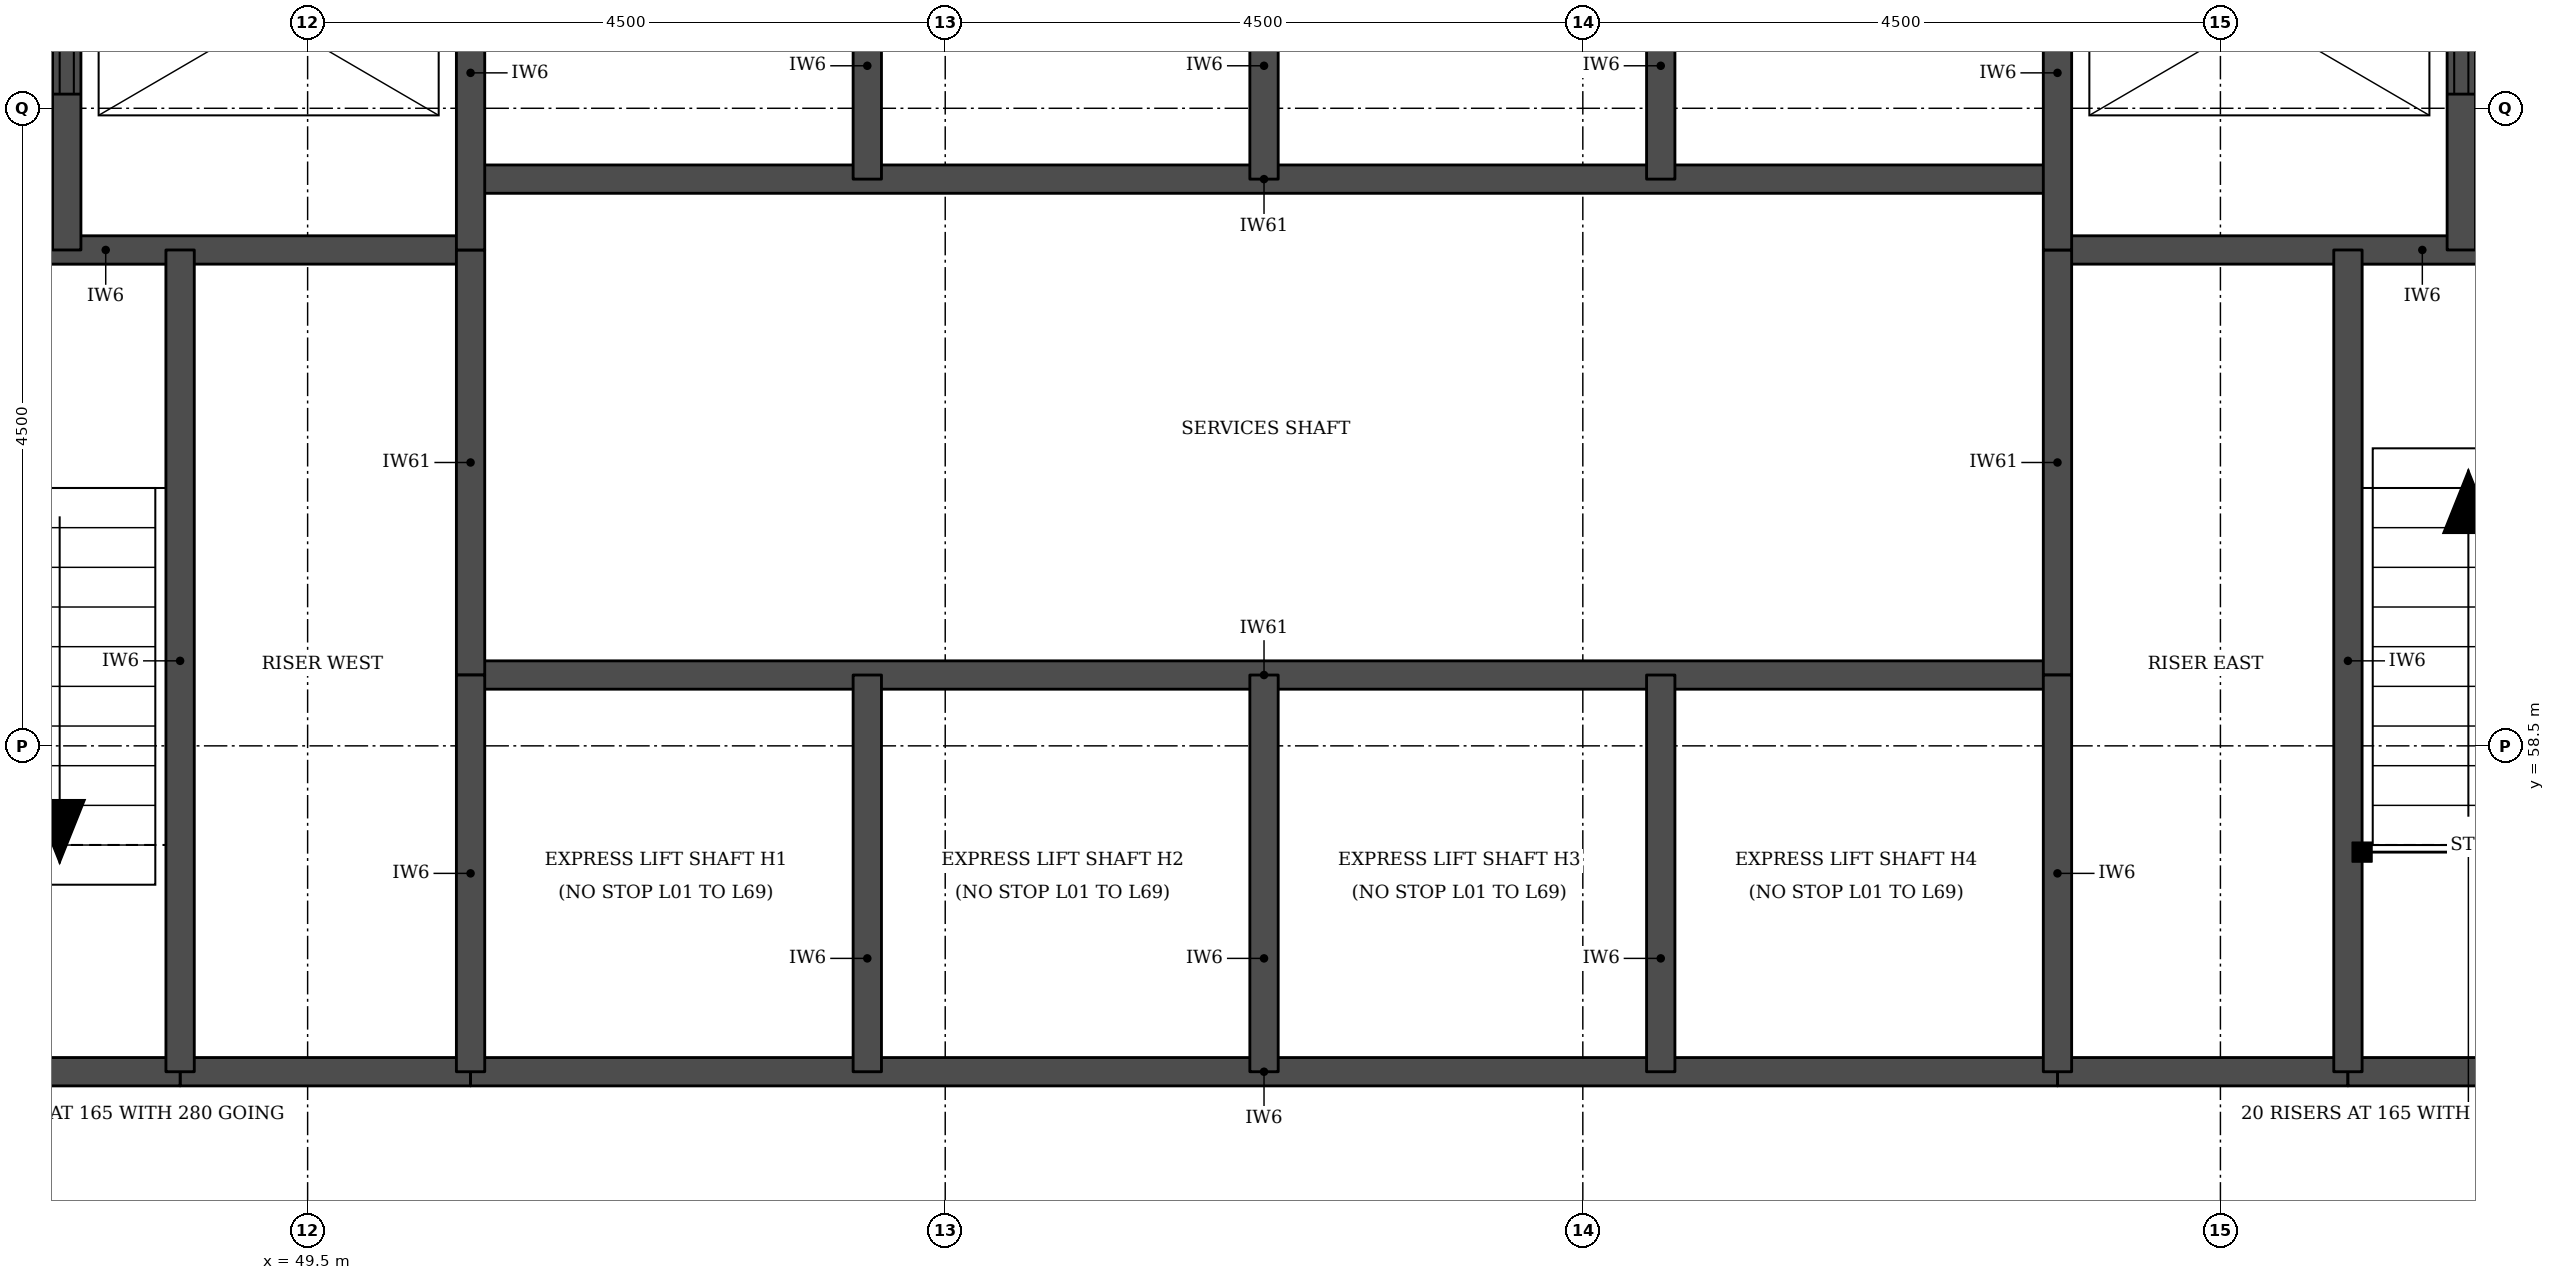
"""IFC4 building model, lengths in metres.
Left out: names, types, materials, properties, quantities, classifications, styles, units other than length and angle.
Written with IfcOpenShell. Run it as: python <this file> out.ifc"""

import sys

from ifc_helpers import new_model, si_unit, direction, frame, frame_2d, origin, place, context, subcontext, project, spatial, rectangle, extrude, element, fill, save


model = new_model("IFC4")
c1 = context("Model", 3, precision=1e-05, world=origin(), true_north=direction((0.0, 1.0)))
c2 = subcontext(c1, "Body", "Model", "MODEL_VIEW")
j1 = project(units=[si_unit("LENGTHUNIT", "METRE"), si_unit("PLANEANGLEUNIT", "RADIAN")], contexts=[c1])
p1 = place(None, origin())
s1 = spatial("IfcSite", under=j1, at=p1, CompositionType="ELEMENT")
p2 = place(p1, origin())
s2 = spatial("IfcBuilding", under=s1, at=p2, CompositionType="ELEMENT")
p3 = place(p2, frame((0.0, 0.0, 59.4)))
s3 = spatial("IfcBuildingStorey", under=s2, at=p3, CompositionType="ELEMENT", Elevation=59.4)
for number, where, z_axis, x_axis in (
    (1, (48.6, 56.2, 0.0), (0.0, 0.0, 1.0), (1.0, 0.0, 0.0)),
    (2, (61.85, 56.2, 0.0), (0.0, 0.0, 1.0), (1.0, 0.0, 0.0)),
):
    element("IfcWall", number, at=place(p3, frame(where, z_axis=z_axis, x_axis=x_axis)), inside=s3, PredefinedType="SOLIDWALL", context=c2, shape_type="SweptSolid", body=[
        extrude(rectangle(XDim=2.05, YDim=0.2, at=frame_2d((1.025, 0.0))), origin(), (0.0, 0.0, 1.0), 3.08),
    ])
p4 = place(p3, frame((45.5, 56.2, 0.0), z_axis=(0.0, 0.0, 1.0), x_axis=(1.0, 0.0, 0.0)))
e3 = element("IfcWall", 3, at=p4, inside=s3, PredefinedType="SOLIDWALL", context=c2, shape_type="SweptSolid", body=[
    extrude(rectangle(XDim=3.1, YDim=0.2, at=frame_2d((1.55, 0.0))), origin(), (0.0, 0.0, 1.0), 3.08),
])
p5 = place(p3, frame((50.65, 56.2, 0.0), z_axis=(0.0, 0.0, 1.0), x_axis=(1.0, 0.0, 0.0)))
e4 = element("IfcWall", 4, at=p5, inside=s3, PredefinedType="SOLIDWALL", context=c2, shape_type="SweptSolid", body=[
    extrude(rectangle(XDim=11.2, YDim=0.2, at=frame_2d((5.6, 0.0))), origin(), (0.0, 0.0, 1.0), 3.08),
])
p6 = place(p3, frame((63.9, 56.2, 0.0), z_axis=(0.0, 0.0, 1.0), x_axis=(1.0, 0.0, 0.0)))
e5 = element("IfcWall", 5, at=p6, inside=s3, PredefinedType="SOLIDWALL", context=c2, shape_type="SweptSolid", body=[
    extrude(rectangle(XDim=3.1, YDim=0.2, at=frame_2d((1.55, 0.0))), origin(), (0.0, 0.0, 1.0), 3.08),
])
p7 = place(p3, frame((50.65, 59.0, 0.0), z_axis=(0.0, 0.0, 1.0), x_axis=(1.0, 0.0, 0.0)))
e6 = element("IfcWall", 6, at=p7, inside=s3, PredefinedType="SOLIDWALL", context=c2, shape_type="SweptSolid", body=[
    extrude(rectangle(XDim=11.2, YDim=0.2, at=frame_2d((5.6, 0.0))), origin(), (0.0, 0.0, 1.0), 3.3),
])
for number, where, z_axis, x_axis in (
    (7, (45.5, 62.0, 0.0), (0.0, 0.0, 1.0), (1.0, 0.0, 0.0)),
    (8, (61.85, 62.0, 0.0), (0.0, 0.0, 1.0), (1.0, 0.0, 0.0)),
):
    element("IfcWall", number, at=place(p3, frame(where, z_axis=z_axis, x_axis=x_axis)), inside=s3, PredefinedType="SOLIDWALL", context=c2, shape_type="SweptSolid", body=[
        extrude(rectangle(XDim=5.15, YDim=0.2, at=frame_2d((2.575, 0.0))), origin(), (0.0, 0.0, 1.0), 3.08),
    ])
p8 = place(p3, frame((50.65, 62.5, 0.0), z_axis=(0.0, 0.0, 1.0), x_axis=(1.0, 0.0, 0.0)))
e9 = element("IfcWall", 9, at=p8, inside=s3, PredefinedType="SOLIDWALL", context=c2, shape_type="SweptSolid", body=[
    extrude(rectangle(XDim=11.2, YDim=0.2, at=frame_2d((5.6, 0.0))), origin(), (0.0, 0.0, 1.0), 3.3),
])
p9 = place(p3, frame((47.8, 62.0, 0.0), z_axis=(0.0, 0.0, 1.0), x_axis=(0.0, 1.0, 0.0)))
e10 = element("IfcWall", 10, at=p9, inside=s3, PredefinedType="SOLIDWALL", context=c2, shape_type="SweptSolid", body=[
    extrude(rectangle(XDim=3.3, YDim=0.2, at=frame_2d((1.65, 0.0))), origin(), (0.0, 0.0, 1.0), 3.08),
])
p10 = place(p9, frame((1.1, 0.0, 0.0)))
e11 = element("IfcOpeningElement", 11, at=p10, cuts=e10, PredefinedType="OPENING", context=c2, shape_type="SweptSolid", body=[
    extrude(rectangle(XDim=1.1, YDim=2.1, at=frame_2d((0.55, 1.05))), frame((0.0, 0.11, 0.0), z_axis=(0.0, -1.0, 0.0), x_axis=(1.0, 0.0, 0.0)), (0.0, 0.0, 1.0), 0.22),
])
p11 = place(p3, frame((48.6, 56.2, 0.0), z_axis=(0.0, 0.0, 1.0), x_axis=(0.0, 1.0, 0.0)))
e12 = element("IfcWall", 12, at=p11, inside=s3, PredefinedType="SOLIDWALL", context=c2, shape_type="SweptSolid", body=[
    extrude(rectangle(XDim=5.8, YDim=0.2, at=frame_2d((2.9, 0.0))), origin(), (0.0, 0.0, 1.0), 3.08),
])
p12 = place(p3, frame((50.65, 59.0, 0.0), z_axis=(0.0, 0.0, 1.0), x_axis=(0.0, 1.0, 0.0)))
e13 = element("IfcWall", 13, at=p12, inside=s3, PredefinedType="SOLIDWALL", context=c2, shape_type="SweptSolid", body=[
    extrude(rectangle(XDim=3.0, YDim=0.2, at=frame_2d((1.5, 0.0))), origin(), (0.0, 0.0, 1.0), 3.3),
])
p13 = place(p3, frame((50.65, 56.2, 0.0), z_axis=(0.0, 0.0, 1.0), x_axis=(0.0, 1.0, 0.0)))
e14 = element("IfcWall", 14, at=p13, inside=s3, PredefinedType="SOLIDWALL", context=c2, shape_type="SweptSolid", body=[
    extrude(rectangle(XDim=2.8, YDim=0.2, at=frame_2d((1.4, 0.0))), origin(), (0.0, 0.0, 1.0), 3.08),
])
p14 = place(p3, frame((50.65, 62.0, 0.0), z_axis=(0.0, 0.0, 1.0), x_axis=(0.0, 1.0, 0.0)))
e15 = element("IfcWall", 15, at=p14, inside=s3, PredefinedType="SOLIDWALL", context=c2, shape_type="SweptSolid", body=[
    extrude(rectangle(XDim=3.3, YDim=0.2, at=frame_2d((1.65, 0.0))), origin(), (0.0, 0.0, 1.0), 3.08),
])
for number, where, z_axis, x_axis in (
    (16, (53.45, 56.2, 0.0), (0.0, 0.0, 1.0), (0.0, 1.0, 0.0)),
    (17, (53.45, 62.5, 0.0), (0.0, 0.0, 1.0), (0.0, 1.0, 0.0)),
    (18, (56.25, 56.2, 0.0), (0.0, 0.0, 1.0), (0.0, 1.0, 0.0)),
    (19, (56.25, 62.5, 0.0), (0.0, 0.0, 1.0), (0.0, 1.0, 0.0)),
    (20, (59.05, 56.2, 0.0), (0.0, 0.0, 1.0), (0.0, 1.0, 0.0)),
    (21, (59.05, 62.5, 0.0), (0.0, 0.0, 1.0), (0.0, 1.0, 0.0)),
):
    element("IfcWall", number, at=place(p3, frame(where, z_axis=z_axis, x_axis=x_axis)), inside=s3, PredefinedType="SOLIDWALL", context=c2, shape_type="SweptSolid", body=[
        extrude(rectangle(XDim=2.8, YDim=0.2, at=frame_2d((1.4, 0.0))), origin(), (0.0, 0.0, 1.0), 3.08),
    ])
p15 = place(p3, frame((61.85, 59.0, 0.0), z_axis=(0.0, 0.0, 1.0), x_axis=(0.0, 1.0, 0.0)))
e22 = element("IfcWall", 22, at=p15, inside=s3, PredefinedType="SOLIDWALL", context=c2, shape_type="SweptSolid", body=[
    extrude(rectangle(XDim=3.0, YDim=0.2, at=frame_2d((1.5, 0.0))), origin(), (0.0, 0.0, 1.0), 3.3),
])
p16 = place(p3, frame((61.85, 56.2, 0.0), z_axis=(0.0, 0.0, 1.0), x_axis=(0.0, 1.0, 0.0)))
e23 = element("IfcWall", 23, at=p16, inside=s3, PredefinedType="SOLIDWALL", context=c2, shape_type="SweptSolid", body=[
    extrude(rectangle(XDim=2.8, YDim=0.2, at=frame_2d((1.4, 0.0))), origin(), (0.0, 0.0, 1.0), 3.08),
])
p17 = place(p3, frame((61.85, 62.0, 0.0), z_axis=(0.0, 0.0, 1.0), x_axis=(0.0, 1.0, 0.0)))
e24 = element("IfcWall", 24, at=p17, inside=s3, PredefinedType="SOLIDWALL", context=c2, shape_type="SweptSolid", body=[
    extrude(rectangle(XDim=3.3, YDim=0.2, at=frame_2d((1.65, 0.0))), origin(), (0.0, 0.0, 1.0), 3.08),
])
p18 = place(p3, frame((63.9, 56.2, 0.0), z_axis=(0.0, 0.0, 1.0), x_axis=(0.0, 1.0, 0.0)))
e25 = element("IfcWall", 25, at=p18, inside=s3, PredefinedType="SOLIDWALL", context=c2, shape_type="SweptSolid", body=[
    extrude(rectangle(XDim=5.8, YDim=0.2, at=frame_2d((2.9, 0.0))), origin(), (0.0, 0.0, 1.0), 3.08),
])
p19 = place(p3, frame((64.7, 62.0, 0.0), z_axis=(0.0, 0.0, 1.0), x_axis=(0.0, 1.0, 0.0)))
e26 = element("IfcWall", 26, at=p19, inside=s3, PredefinedType="SOLIDWALL", context=c2, shape_type="SweptSolid", body=[
    extrude(rectangle(XDim=3.3, YDim=0.2, at=frame_2d((1.65, 0.0))), origin(), (0.0, 0.0, 1.0), 3.08),
])
p20 = place(p19, frame((1.1, 0.0, 0.0)))
e27 = element("IfcOpeningElement", 27, at=p20, cuts=e26, PredefinedType="OPENING", context=c2, shape_type="SweptSolid", body=[
    extrude(rectangle(XDim=1.1, YDim=2.1, at=frame_2d((0.55, 1.05))), frame((0.0, 0.11, 0.0), z_axis=(0.0, -1.0, 0.0), x_axis=(1.0, 0.0, 0.0)), (0.0, 0.0, 1.0), 0.22),
])
p21 = place(p10, origin())
e28 = element("IfcDoor", 28, at=p21, inside=s3, OperationType="DOUBLE_DOOR_SLIDING", PredefinedType="DOOR", context=c2, shape_type="SweptSolid", body=[
    extrude(rectangle(XDim=1.1, YDim=2.1, at=frame_2d((0.55, 1.05))), frame((0.0, 0.025, 0.0), z_axis=(0.0, -1.0, 0.0), x_axis=(1.0, 0.0, 0.0)), (0.0, 0.0, 1.0), 0.05),
])
fill(e11, e28)
p22 = place(p20, origin())
e29 = element("IfcDoor", 29, at=p22, inside=s3, OperationType="DOUBLE_DOOR_SLIDING", PredefinedType="DOOR", context=c2, shape_type="SweptSolid", body=[
    extrude(rectangle(XDim=1.1, YDim=2.1, at=frame_2d((0.55, 1.05))), frame((0.0, 0.025, 0.0), z_axis=(0.0, -1.0, 0.0), x_axis=(1.0, 0.0, 0.0)), (0.0, 0.0, 1.0), 0.05),
])
fill(e27, e29)
save(model, sys.argv[1])
